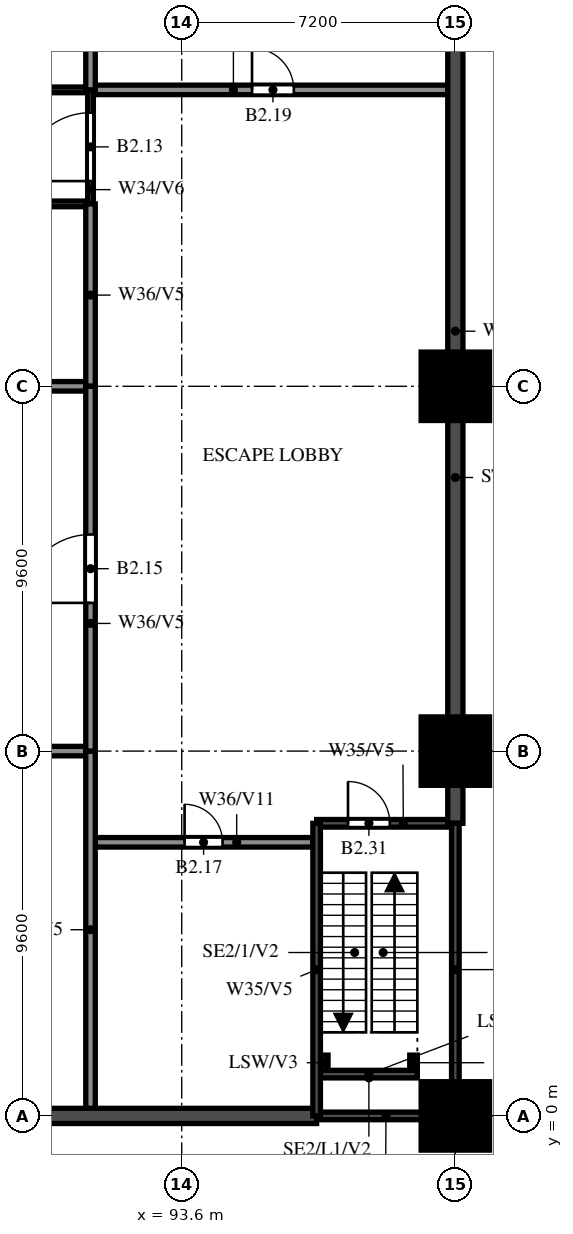
"""IFC4 building model, lengths in metres.
Left out: names, types, materials, properties, quantities, classifications, styles, units other than length and angle.
Written with IfcOpenShell. Run it as: python <this file> out.ifc"""

import sys

from ifc_helpers import new_model, si_unit, direction, frame, frame_2d, origin, origin_2d, place, context, subcontext, project, spatial, rectangle, extrude, source, transform, mapped, element, fill, save


model = new_model("IFC4")
c1 = context("Model", 3, precision=1e-05, world=origin(), true_north=direction((0.0, 1.0)))
c2 = subcontext(c1, "Body", "Model", "MODEL_VIEW")
j1 = project(units=[si_unit("LENGTHUNIT", "METRE"), si_unit("PLANEANGLEUNIT", "RADIAN")], contexts=[c1])
p1 = place(None, origin())
s1 = spatial("IfcSite", under=j1, at=p1, CompositionType="ELEMENT")
p2 = place(p1, origin())
s2 = spatial("IfcBuilding", under=s1, at=p2, CompositionType="ELEMENT")
p3 = place(p2, frame((0.0, 0.0, -11.4)))
s3 = spatial("IfcBuildingStorey", under=s2, at=p3, CompositionType="ELEMENT", Elevation=-11.4)
m1 = source(origin(), c2, "Body", "SweptSolid", [
    extrude(rectangle(XDim=1.8, YDim=1.8, at=origin_2d()), origin(), (0.0, 0.0, 1.0), 5.6),
])
for number, where, z_axis, x_axis in (
    (1, (100.8, 0.0, 0.0), (0.0, 0.0, 1.0), (1.0, 0.0, 0.0)),
    (2, (100.8, 9.6, 0.0), (0.0, 0.0, 1.0), (1.0, 0.0, 0.0)),
    (3, (100.8, 19.2, 0.0), (0.0, 0.0, 1.0), (1.0, 0.0, 0.0)),
):
    element("IfcColumn", number, at=place(p3, frame(where, z_axis=z_axis, x_axis=x_axis)), inside=s3, PredefinedType="COLUMN", context=c2, shape_type="MappedRepresentation", body=[
        mapped(m1, transform((0.0, 0.0, 0.0))),
    ])
for number, where, z_axis, x_axis in (
    (4, (97.35, 1.2, 0.0), (0.0, 0.0, 1.0), (0.0, 1.0, 0.0)),
    (5, (99.7, 1.2, 0.0), (0.0, 0.0, 1.0), (0.0, 1.0, 0.0)),
):
    element("IfcWall", number, at=place(p3, frame(where, z_axis=z_axis, x_axis=x_axis)), inside=s3, PredefinedType="SOLIDWALL", context=c2, shape_type="SweptSolid", body=[
        extrude(rectangle(XDim=0.4, YDim=0.2, at=frame_2d((0.2, 0.0))), origin(), (0.0, 0.0, 1.0), 2.8),
    ])
p4 = place(p3, frame((97.25, 1.1, 0.0), z_axis=(0.0, 0.0, 1.0), x_axis=(1.0, 0.0, 0.0)))
e6 = element("IfcWall", 6, at=p4, inside=s3, PredefinedType="SOLIDWALL", context=c2, shape_type="SweptSolid", body=[
    extrude(rectangle(XDim=2.55, YDim=0.2, at=frame_2d((1.275, 0.0))), origin(), (0.0, 0.0, 1.0), 2.8),
])
p5 = place(p3, frame((3.65, 0.0, 0.0), z_axis=(0.0, 0.0, 1.0), x_axis=(1.0, 0.0, 0.0)))
e7 = element("IfcWall", 7, at=p5, inside=s3, PredefinedType="SOLIDWALL", context=c2, shape_type="SweptSolid", body=[
    extrude(rectangle(XDim=93.5, YDim=0.4, at=frame_2d((46.75, 0.0))), origin(), (0.0, 0.0, 1.0), 5.6),
])
p6 = place(p3, frame((97.15, 0.0, 0.0), z_axis=(0.0, 0.0, 1.0), x_axis=(1.0, 0.0, 0.0)))
e8 = element("IfcWall", 8, at=p6, inside=s3, PredefinedType="SOLIDWALL", context=c2, shape_type="SweptSolid", body=[
    extrude(rectangle(XDim=3.65, YDim=0.2, at=frame_2d((1.825, 0.0))), origin(), (0.0, 0.0, 1.0), 5.6),
])
p7 = place(p3, frame((91.325, 7.2, 0.0), z_axis=(0.0, 0.0, 1.0), x_axis=(1.0, 0.0, 0.0)))
e9 = element("IfcWall", 9, at=p7, inside=s3, PredefinedType="SOLIDWALL", context=c2, shape_type="SweptSolid", body=[
    extrude(rectangle(XDim=5.725, YDim=0.25, at=frame_2d((2.863, 0.0))), origin(), (0.0, 0.0, 1.0), 5.6),
])
p8 = place(p7, frame((2.35, 0.0, 0.0)))
e10 = element("IfcOpeningElement", 10, at=p8, cuts=e9, PredefinedType="OPENING", context=c2, shape_type="SweptSolid", body=[
    extrude(rectangle(XDim=1.0, YDim=2.1, at=frame_2d((0.5, 1.05))), frame((0.0, 0.135, 0.0), z_axis=(0.0, -1.0, 0.0), x_axis=(1.0, 0.0, 0.0)), (0.0, 0.0, 1.0), 0.27),
])
p9 = place(p3, frame((97.15, 7.7, 0.0), z_axis=(0.0, 0.0, 1.0), x_axis=(1.0, 0.0, 0.0)))
e11 = element("IfcWall", 11, at=p9, inside=s3, PredefinedType="SOLIDWALL", context=c2, shape_type="SweptSolid", body=[
    extrude(rectangle(XDim=3.65, YDim=0.2, at=frame_2d((1.825, 0.0))), origin(), (0.0, 0.0, 1.0), 5.6),
])
p10 = place(p9, frame((0.825, 0.0, 0.0)))
e12 = element("IfcOpeningElement", 12, at=p10, cuts=e11, PredefinedType="OPENING", context=c2, shape_type="SweptSolid", body=[
    extrude(rectangle(XDim=1.1, YDim=2.1, at=frame_2d((0.55, 1.05))), frame((0.0, 0.11, 0.0), z_axis=(0.0, -1.0, 0.0), x_axis=(1.0, 0.0, 0.0)), (0.0, 0.0, 1.0), 0.22),
])
p11 = place(p3, frame((9.6, 9.6, 0.0), z_axis=(0.0, 0.0, 1.0), x_axis=(1.0, 0.0, 0.0)))
e13 = element("IfcWall", 13, at=p11, inside=s3, PredefinedType="SOLIDWALL", context=c2, shape_type="SweptSolid", body=[
    extrude(rectangle(XDim=81.6, YDim=0.25, at=frame_2d((40.8, 0.0))), origin(), (0.0, 0.0, 1.0), 2.2),
])
p12 = place(p11, frame((11.1, 0.0, 0.0)))
e14 = element("IfcOpeningElement", 14, at=p12, cuts=e13, PredefinedType="OPENING", context=c2, shape_type="SweptSolid", body=[
    extrude(rectangle(XDim=1.8, YDim=2.1, at=frame_2d((0.9, 1.05))), frame((0.0, 0.135, 0.0), z_axis=(0.0, -1.0, 0.0), x_axis=(1.0, 0.0, 0.0)), (0.0, 0.0, 1.0), 0.27),
])
p13 = place(p11, frame((25.5, 0.0, 0.0)))
e15 = element("IfcOpeningElement", 15, at=p13, cuts=e13, PredefinedType="OPENING", context=c2, shape_type="SweptSolid", body=[
    extrude(rectangle(XDim=1.8, YDim=2.1, at=frame_2d((0.9, 1.05))), frame((0.0, 0.135, 0.0), z_axis=(0.0, -1.0, 0.0), x_axis=(1.0, 0.0, 0.0)), (0.0, 0.0, 1.0), 0.27),
])
p14 = place(p11, frame((39.9, 0.0, 0.0)))
e16 = element("IfcOpeningElement", 16, at=p14, cuts=e13, PredefinedType="OPENING", context=c2, shape_type="SweptSolid", body=[
    extrude(rectangle(XDim=1.8, YDim=2.1, at=frame_2d((0.9, 1.05))), frame((0.0, 0.135, 0.0), z_axis=(0.0, -1.0, 0.0), x_axis=(1.0, 0.0, 0.0)), (0.0, 0.0, 1.0), 0.27),
])
p15 = place(p11, frame((54.3, 0.0, 0.0)))
e17 = element("IfcOpeningElement", 17, at=p15, cuts=e13, PredefinedType="OPENING", context=c2, shape_type="SweptSolid", body=[
    extrude(rectangle(XDim=1.8, YDim=2.1, at=frame_2d((0.9, 1.05))), frame((0.0, 0.135, 0.0), z_axis=(0.0, -1.0, 0.0), x_axis=(1.0, 0.0, 0.0)), (0.0, 0.0, 1.0), 0.27),
])
p16 = place(p11, frame((68.7, 0.0, 0.0)))
e18 = element("IfcOpeningElement", 18, at=p16, cuts=e13, PredefinedType="OPENING", context=c2, shape_type="SweptSolid", body=[
    extrude(rectangle(XDim=1.8, YDim=2.1, at=frame_2d((0.9, 1.05))), frame((0.0, 0.135, 0.0), z_axis=(0.0, -1.0, 0.0), x_axis=(1.0, 0.0, 0.0)), (0.0, 0.0, 1.0), 0.27),
])
p17 = place(p3, frame((63.6, 19.2, 0.0), z_axis=(0.0, 0.0, 1.0), x_axis=(1.0, 0.0, 0.0)))
e19 = element("IfcWall", 19, at=p17, inside=s3, PredefinedType="SOLIDWALL", context=c2, shape_type="SweptSolid", body=[
    extrude(rectangle(XDim=27.6, YDim=0.25, at=frame_2d((13.8, 0.0))), origin(), (0.0, 0.0, 1.0), 2.2),
])
p18 = place(p17, frame((0.3, 0.0, 0.0)))
e20 = element("IfcOpeningElement", 20, at=p18, cuts=e19, PredefinedType="OPENING", context=c2, shape_type="SweptSolid", body=[
    extrude(rectangle(XDim=1.8, YDim=2.1, at=frame_2d((0.9, 1.05))), frame((0.0, 0.135, 0.0), z_axis=(0.0, -1.0, 0.0), x_axis=(1.0, 0.0, 0.0)), (0.0, 0.0, 1.0), 0.27),
])
p19 = place(p17, frame((14.7, 0.0, 0.0)))
e21 = element("IfcOpeningElement", 21, at=p19, cuts=e19, PredefinedType="OPENING", context=c2, shape_type="SweptSolid", body=[
    extrude(rectangle(XDim=1.8, YDim=2.1, at=frame_2d((0.9, 1.05))), frame((0.0, 0.135, 0.0), z_axis=(0.0, -1.0, 0.0), x_axis=(1.0, 0.0, 0.0)), (0.0, 0.0, 1.0), 0.27),
])
p20 = place(p3, frame((9.6, 24.0, 0.0), z_axis=(0.0, 0.0, 1.0), x_axis=(1.0, 0.0, 0.0)))
e22 = element("IfcWall", 22, at=p20, inside=s3, PredefinedType="PARTITIONING", context=c2, shape_type="SweptSolid", body=[
    extrude(rectangle(XDim=81.6, YDim=0.15, at=frame_2d((40.8, 0.0))), origin(), (0.0, 0.0, 1.0), 4.4),
])
p21 = place(p3, frame((63.6, 27.0, 0.0), z_axis=(0.0, 0.0, 1.0), x_axis=(1.0, 0.0, 0.0)))
e23 = element("IfcWall", 23, at=p21, inside=s3, PredefinedType="PARTITIONING", context=c2, shape_type="SweptSolid", body=[
    extrude(rectangle(XDim=27.6, YDim=0.15, at=frame_2d((13.8, 0.0))), origin(), (0.0, 0.0, 1.0), 4.4),
])
p22 = place(p21, frame((3.9, 0.0, 0.0)))
e24 = element("IfcOpeningElement", 24, at=p22, cuts=e23, PredefinedType="OPENING", context=c2, shape_type="SweptSolid", body=[
    extrude(rectangle(XDim=1.2, YDim=2.1, at=frame_2d((0.6, 1.05))), frame((0.0, 0.085, 0.0), z_axis=(0.0, -1.0, 0.0), x_axis=(1.0, 0.0, 0.0)), (0.0, 0.0, 1.0), 0.17),
])
p23 = place(p21, frame((12.9, 0.0, 0.0)))
e25 = element("IfcOpeningElement", 25, at=p23, cuts=e23, PredefinedType="OPENING", context=c2, shape_type="SweptSolid", body=[
    extrude(rectangle(XDim=1.2, YDim=2.1, at=frame_2d((0.6, 1.05))), frame((0.0, 0.085, 0.0), z_axis=(0.0, -1.0, 0.0), x_axis=(1.0, 0.0, 0.0)), (0.0, 0.0, 1.0), 0.17),
])
p24 = place(p21, frame((22.2, 0.0, 0.0)))
e26 = element("IfcOpeningElement", 26, at=p24, cuts=e23, PredefinedType="OPENING", context=c2, shape_type="SweptSolid", body=[
    extrude(rectangle(XDim=1.2, YDim=2.1, at=frame_2d((0.6, 1.05))), frame((0.0, 0.085, 0.0), z_axis=(0.0, -1.0, 0.0), x_axis=(1.0, 0.0, 0.0)), (0.0, 0.0, 1.0), 0.17),
])
p25 = place(p3, frame((91.2, 27.0, 0.0), z_axis=(0.0, 0.0, 1.0), x_axis=(1.0, 0.0, 0.0)))
e27 = element("IfcWall", 27, at=p25, inside=s3, PredefinedType="SOLIDWALL", context=c2, shape_type="SweptSolid", body=[
    extrude(rectangle(XDim=9.4, YDim=0.25, at=frame_2d((4.7, 0.0))), origin(), (0.0, 0.0, 1.0), 4.4),
])
p26 = place(p25, frame((4.25, 0.0, 0.0)))
e28 = element("IfcOpeningElement", 28, at=p26, cuts=e27, PredefinedType="OPENING", context=c2, shape_type="SweptSolid", body=[
    extrude(rectangle(XDim=1.1, YDim=2.1, at=frame_2d((0.55, 1.05))), frame((0.0, 0.135, 0.0), z_axis=(0.0, -1.0, 0.0), x_axis=(1.0, 0.0, 0.0)), (0.0, 0.0, 1.0), 0.27),
])
p27 = place(p3, frame((91.2, 24.0, 0.0), z_axis=(0.0, 0.0, 1.0), x_axis=(0.0, 1.0, 0.0)))
e29 = element("IfcWall", 29, at=p27, inside=s3, PredefinedType="PARTITIONING", context=c2, shape_type="SweptSolid", body=[
    extrude(rectangle(XDim=3.0, YDim=0.15, at=frame_2d((1.5, 0.0))), origin(), (0.0, 0.0, 1.0), 5.6),
])
p28 = place(p27, frame((0.6, 0.0, 0.0)))
e30 = element("IfcOpeningElement", 30, at=p28, cuts=e29, PredefinedType="OPENING", context=c2, shape_type="SweptSolid", body=[
    extrude(rectangle(XDim=1.8, YDim=2.1, at=frame_2d((0.9, 1.05))), frame((0.0, 0.085, 0.0), z_axis=(0.0, -1.0, 0.0), x_axis=(1.0, 0.0, 0.0)), (0.0, 0.0, 1.0), 0.17),
])
p29 = place(p3, frame((91.2, 0.2, 0.0), z_axis=(0.0, 0.0, 1.0), x_axis=(0.0, 1.0, 0.0)))
e31 = element("IfcWall", 31, at=p29, inside=s3, PredefinedType="SOLIDWALL", context=c2, shape_type="SweptSolid", body=[
    extrude(rectangle(XDim=9.4, YDim=0.25, at=frame_2d((4.7, 0.0))), origin(), (0.0, 0.0, 1.0), 2.2),
])
p30 = place(p3, frame((91.2, 19.2, 0.0), z_axis=(0.0, 0.0, 1.0), x_axis=(0.0, 1.0, 0.0)))
e32 = element("IfcWall", 32, at=p30, inside=s3, PredefinedType="SOLIDWALL", context=c2, shape_type="SweptSolid", body=[
    extrude(rectangle(XDim=4.8, YDim=0.25, at=frame_2d((2.4, 0.0))), origin(), (0.0, 0.0, 1.0), 2.2),
])
p31 = place(p3, frame((91.2, 27.0, 0.0), z_axis=(0.0, 0.0, 1.0), x_axis=(0.0, 1.0, 0.0)))
e33 = element("IfcWall", 33, at=p31, inside=s3, PredefinedType="SOLIDWALL", context=c2, shape_type="SweptSolid", body=[
    extrude(rectangle(XDim=6.4, YDim=0.25, at=frame_2d((3.2, 0.0))), origin(), (0.0, 0.0, 1.0), 5.6),
])
p32 = place(p3, frame((91.2, 9.6, 0.0), z_axis=(0.0, 0.0, 1.0), x_axis=(0.0, 1.0, 0.0)))
e34 = element("IfcWall", 34, at=p32, inside=s3, PredefinedType="SOLIDWALL", context=c2, shape_type="SweptSolid", body=[
    extrude(rectangle(XDim=9.6, YDim=0.25, at=frame_2d((4.8, 0.0))), origin(), (0.0, 0.0, 1.0), 2.2),
])
p33 = place(p32, frame((3.9, 0.0, 0.0)))
e35 = element("IfcOpeningElement", 35, at=p33, cuts=e34, PredefinedType="OPENING", context=c2, shape_type="SweptSolid", body=[
    extrude(rectangle(XDim=1.8, YDim=2.1, at=frame_2d((0.9, 1.05))), frame((0.0, 0.135, 0.0), z_axis=(0.0, -1.0, 0.0), x_axis=(1.0, 0.0, 0.0)), (0.0, 0.0, 1.0), 0.27),
])
p34 = place(p3, frame((97.15, 0.0, 0.0), z_axis=(0.0, 0.0, 1.0), x_axis=(0.0, 1.0, 0.0)))
e36 = element("IfcWall", 36, at=p34, inside=s3, PredefinedType="SOLIDWALL", context=c2, shape_type="SweptSolid", body=[
    extrude(rectangle(XDim=7.7, YDim=0.2, at=frame_2d((3.85, 0.0))), origin(), (0.0, 0.0, 1.0), 5.6),
])
p35 = place(p3, frame((100.8, 7.7, 0.0), z_axis=(0.0, 0.0, 1.0), x_axis=(0.0, 1.0, 0.0)))
e37 = element("IfcWall", 37, at=p35, inside=s3, PredefinedType="SOLIDWALL", context=c2, shape_type="SweptSolid", body=[
    extrude(rectangle(XDim=25.9, YDim=0.4, at=frame_2d((12.95, 0.0))), origin(), (0.0, 0.0, 1.0), 5.6),
])
p36 = place(p3, frame((100.8, 0.0, 0.0), z_axis=(0.0, 0.0, 1.0), x_axis=(0.0, 1.0, 0.0)))
e38 = element("IfcWall", 38, at=p36, inside=s3, PredefinedType="SOLIDWALL", context=c2, shape_type="SweptSolid", body=[
    extrude(rectangle(XDim=7.7, YDim=0.2, at=frame_2d((3.85, 0.0))), origin(), (0.0, 0.0, 1.0), 5.6),
])
p37 = place(p28, origin())
e39 = element("IfcDoor", 39, at=p37, inside=s3, OperationType="DOUBLE_DOOR_SINGLE_SWING", PredefinedType="DOOR", context=c2, shape_type="SweptSolid", body=[
    extrude(rectangle(XDim=1.8, YDim=2.1, at=frame_2d((0.9, 1.05))), frame((0.0, 0.025, 0.0), z_axis=(0.0, -1.0, 0.0), x_axis=(1.0, 0.0, 0.0)), (0.0, 0.0, 1.0), 0.05),
])
fill(e30, e39)
p38 = place(p33, origin())
e40 = element("IfcDoor", 40, at=p38, inside=s3, OperationType="DOUBLE_DOOR_SINGLE_SWING", PredefinedType="DOOR", context=c2, shape_type="SweptSolid", body=[
    extrude(rectangle(XDim=1.8, YDim=2.1, at=frame_2d((0.9, 1.05))), frame((0.0, 0.025, 0.0), z_axis=(0.0, -1.0, 0.0), x_axis=(1.0, 0.0, 0.0)), (0.0, 0.0, 1.0), 0.05),
])
fill(e35, e40)
p39 = place(p8, origin())
e41 = element("IfcDoor", 41, at=p39, inside=s3, OperationType="SINGLE_SWING_LEFT", PredefinedType="DOOR", context=c2, shape_type="SweptSolid", body=[
    extrude(rectangle(XDim=1.0, YDim=2.1, at=frame_2d((0.5, 1.05))), frame((0.0, 0.025, 0.0), z_axis=(0.0, -1.0, 0.0), x_axis=(1.0, 0.0, 0.0)), (0.0, 0.0, 1.0), 0.05),
])
fill(e10, e41)
p40 = place(p26, origin())
e42 = element("IfcDoor", 42, at=p40, inside=s3, OperationType="SINGLE_SWING_RIGHT", PredefinedType="DOOR", context=c2, shape_type="SweptSolid", body=[
    extrude(rectangle(XDim=1.1, YDim=2.1, at=frame_2d((0.55, 1.05))), frame((0.0, 0.025, 0.0), z_axis=(0.0, -1.0, 0.0), x_axis=(1.0, 0.0, 0.0)), (0.0, 0.0, 1.0), 0.05),
])
fill(e28, e42)
p41 = place(p10, origin())
e43 = element("IfcDoor", 43, at=p41, inside=s3, OperationType="SINGLE_SWING_LEFT", PredefinedType="DOOR", context=c2, shape_type="SweptSolid", body=[
    extrude(rectangle(XDim=1.1, YDim=2.1, at=frame_2d((0.55, 1.05))), frame((0.0, 0.025, 0.0), z_axis=(0.0, -1.0, 0.0), x_axis=(1.0, 0.0, 0.0)), (0.0, 0.0, 1.0), 0.05),
])
fill(e12, e43)
save(model, sys.argv[1])
